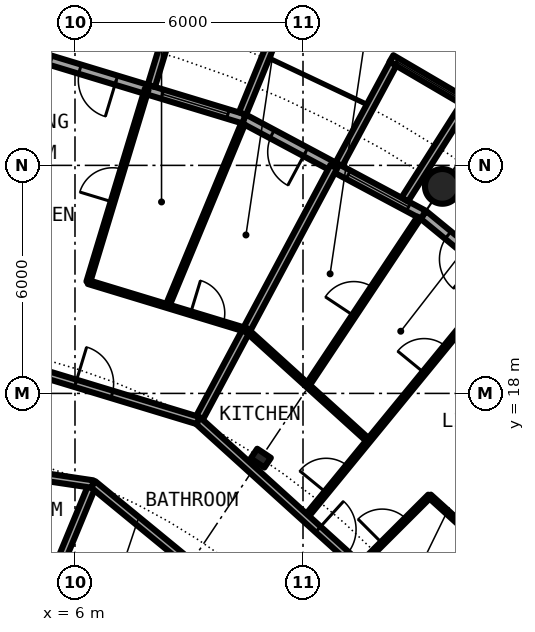
"""IFC4 building model, lengths in metres.
Left out: names, types, materials, properties, quantities, classifications, styles, units other than length and angle.
Written with IfcOpenShell. Run it as: python <this file> out.ifc"""

import sys

from ifc_helpers import new_model, si_unit, direction, frame, frame_2d, origin, origin_2d, place, context, subcontext, project, spatial, rectangle, circle, hollow_circle, i_section, extrude, element, fill, save


model = new_model("IFC4")
c1 = context("Model", 3, precision=1e-05, world=origin(), true_north=direction((0.0, 1.0)))
c2 = subcontext(c1, "Body", "Model", "MODEL_VIEW")
j1 = project(units=[si_unit("LENGTHUNIT", "METRE"), si_unit("PLANEANGLEUNIT", "RADIAN")], contexts=[c1])
p1 = place(None, origin())
s1 = spatial("IfcSite", under=j1, at=p1, CompositionType="ELEMENT")
p2 = place(p1, origin())
s2 = spatial("IfcBuilding", under=s1, at=p2, CompositionType="ELEMENT")
p3 = place(p2, frame((0.0, 0.0, 129.95)))
s3 = spatial("IfcBuildingStorey", under=s2, at=p3, CompositionType="ELEMENT", Elevation=129.95)
p4 = place(p3, frame((15.667, 23.448, 0.0), z_axis=(0.0, 0.0, 1.0), x_axis=(1.0, 0.0, 0.0)))
e1 = element("IfcColumn", 1, at=p4, inside=s3, PredefinedType="COLUMN", context=c2, shape_type="SweptSolid", body=[
    extrude(hollow_circle(Radius=0.457, WallThickness=0.04, at=origin_2d()), origin(), (0.0, 0.0, 1.0), 3.05),
])
p5 = place(p3, frame((10.889, 16.297, 0.0), z_axis=(0.0, 0.0, 1.0), x_axis=(0.55557023302, 0.831469612303, 0.0)))
e2 = element("IfcColumn", 2, at=p5, inside=s3, PredefinedType="COLUMN", context=c2, shape_type="SweptSolid", body=[
    extrude(i_section(OverallWidth=0.307, OverallDepth=0.432, WebThickness=0.021, FlangeThickness=0.04, FilletRadius=0.027, at=origin_2d()), origin(), (0.0, 0.0, 1.0), 3.05),
])
p6 = place(p3, frame((19.304, 19.304, 0.0), z_axis=(0.0, 0.0, 1.0), x_axis=(-0.773019449054, 0.634382322723, 0.0)))
e3 = element("IfcWall", 3, at=p6, inside=s3, PredefinedType="SOLIDWALL", context=c2, shape_type="SweptSolid", body=[
    extrude(rectangle(XDim=5.352, YDim=0.25, at=frame_2d((2.676, 0.0))), origin(), (0.0, 0.0, 1.0), 2.7),
])
p7 = place(p6, frame((0.441, 0.0, 0.3)))
e4 = element("IfcOpeningElement", 4, at=p7, cuts=e3, PredefinedType="OPENING", context=c2, shape_type="SweptSolid", body=[
    extrude(rectangle(XDim=1.8, YDim=2.1, at=frame_2d((0.9, 1.05))), frame((0.0, 0.135, 0.0), z_axis=(0.0, -1.0, 0.0), x_axis=(1.0, 0.0, 0.0)), (0.0, 0.0, 1.0), 0.27),
])
p8 = place(p6, frame((3.51, 0.0, 0.0)))
e5 = element("IfcOpeningElement", 5, at=p8, cuts=e3, PredefinedType="OPENING", context=c2, shape_type="SweptSolid", body=[
    extrude(rectangle(XDim=1.0, YDim=2.2, at=frame_2d((0.5, 1.1))), frame((0.0, 0.135, 0.0), z_axis=(0.0, -1.0, 0.0), x_axis=(1.0, 0.0, 0.0)), (0.0, 0.0, 1.0), 0.27),
])
p9 = place(p3, frame((15.167, 22.699, 0.0), z_axis=(0.0, 0.0, 1.0), x_axis=(-0.881915646801, 0.471407246368, 0.0)))
e6 = element("IfcWall", 6, at=p9, inside=s3, PredefinedType="SOLIDWALL", context=c2, shape_type="SweptSolid", body=[
    extrude(rectangle(XDim=5.352, YDim=0.25, at=frame_2d((2.676, 0.0))), origin(), (0.0, 0.0, 1.0), 2.7),
])
p10 = place(p9, frame((0.441, 0.0, 0.3)))
e7 = element("IfcOpeningElement", 7, at=p10, cuts=e6, PredefinedType="OPENING", context=c2, shape_type="SweptSolid", body=[
    extrude(rectangle(XDim=1.8, YDim=2.1, at=frame_2d((0.9, 1.05))), frame((0.0, 0.135, 0.0), z_axis=(0.0, -1.0, 0.0), x_axis=(1.0, 0.0, 0.0)), (0.0, 0.0, 1.0), 0.27),
])
p11 = place(p9, frame((3.51, 0.0, 0.0)))
e8 = element("IfcOpeningElement", 8, at=p11, cuts=e6, PredefinedType="OPENING", context=c2, shape_type="SweptSolid", body=[
    extrude(rectangle(XDim=1.0, YDim=2.2, at=frame_2d((0.5, 1.1))), frame((0.0, 0.135, 0.0), z_axis=(0.0, -1.0, 0.0), x_axis=(1.0, 0.0, 0.0)), (0.0, 0.0, 1.0), 0.27),
])
p12 = place(p3, frame((16.39, 25.603, -0.03), z_axis=(0.0, 0.0, 1.0), x_axis=(-0.862762477128, 0.505609442218, 0.0)))
e9 = element("IfcWall", 9, at=p12, inside=s3, PredefinedType="SOLIDWALL", context=c2, shape_type="SweptSolid", body=[
    extrude(rectangle(XDim=2.391, YDim=0.2, at=frame_2d((1.196, 0.0))), origin(), (0.0, 0.0, 1.0), 2.73),
])
p13 = place(p12, frame((0.156, 0.0, 0.33)))
e10 = element("IfcOpeningElement", 10, at=p13, cuts=e9, PredefinedType="OPENING", context=c2, shape_type="SweptSolid", body=[
    extrude(circle(Radius=1.04, at=frame_2d((1.04, 1.04))), frame((0.0, 0.11, 0.0), z_axis=(0.0, -1.0, 0.0), x_axis=(1.0, 0.0, 0.0)), (0.0, 0.0, 1.0), 0.22),
])
p14 = place(p3, frame((14.678, 23.102, -0.03), z_axis=(0.0, 0.0, 1.0), x_axis=(0.536001536573, 0.844217005746, 0.0)))
e11 = element("IfcWall", 11, at=p14, inside=s3, PredefinedType="SOLIDWALL", context=c2, shape_type="SweptSolid", body=[
    extrude(rectangle(XDim=2.929, YDim=0.2, at=frame_2d((1.465, 0.0))), origin(), (0.0, 0.0, 1.0), 2.73),
])
p15 = place(p3, frame((12.945, 24.029, -0.03), z_axis=(0.0, 0.0, 1.0), x_axis=(0.474424310775, 0.88029629861, 0.0)))
e12 = element("IfcWall", 12, at=p15, inside=s3, PredefinedType="SOLIDWALL", context=c2, shape_type="SweptSolid", body=[
    extrude(rectangle(XDim=3.006, YDim=0.2, at=frame_2d((1.503, 0.0))), origin(), (0.0, 0.0, 1.0), 2.73),
])
p16 = place(p3, frame((10.447, 25.222, 0.0), z_axis=(0.0, 0.0, 1.0), x_axis=(-0.956965678721, 0.290201119486, 0.0)))
e13 = element("IfcWall", 13, at=p16, inside=s3, PredefinedType="SOLIDWALL", context=c2, shape_type="SweptSolid", body=[
    extrude(rectangle(XDim=5.351, YDim=0.25, at=frame_2d((2.676, 0.0))), origin(), (0.0, 0.0, 1.0), 2.7),
])
p17 = place(p16, frame((0.441, 0.0, 0.3)))
e14 = element("IfcOpeningElement", 14, at=p17, cuts=e13, PredefinedType="OPENING", context=c2, shape_type="SweptSolid", body=[
    extrude(rectangle(XDim=1.8, YDim=2.1, at=frame_2d((0.9, 1.05))), frame((0.0, 0.135, 0.0), z_axis=(0.0, -1.0, 0.0), x_axis=(1.0, 0.0, 0.0)), (0.0, 0.0, 1.0), 0.27),
])
p18 = place(p16, frame((3.51, 0.0, 0.0)))
e15 = element("IfcOpeningElement", 15, at=p18, cuts=e13, PredefinedType="OPENING", context=c2, shape_type="SweptSolid", body=[
    extrude(rectangle(XDim=1.0, YDim=2.2, at=frame_2d((0.5, 1.1))), frame((0.0, 0.135, 0.0), z_axis=(0.0, -1.0, 0.0), x_axis=(1.0, 0.0, 0.0)), (0.0, 0.0, 1.0), 0.27),
])
p19 = place(p3, frame((10.409, 25.364, -0.03), z_axis=(0.0, 0.0, 1.0), x_axis=(0.379509886562, 0.925187681501, 0.0)))
e16 = element("IfcWall", 16, at=p19, inside=s3, PredefinedType="SOLIDWALL", context=c2, shape_type="SweptSolid", body=[
    extrude(rectangle(XDim=2.883, YDim=0.2, at=frame_2d((1.441, 0.0))), origin(), (0.0, 0.0, 1.0), 2.73),
])
p20 = place(p3, frame((8.009, 26.092, -0.03), z_axis=(0.0, 0.0, 1.0), x_axis=(0.293406695073, 0.955987715029, 0.0)))
e17 = element("IfcWall", 17, at=p20, inside=s3, PredefinedType="SOLIDWALL", context=c2, shape_type="SweptSolid", body=[
    extrude(rectangle(XDim=3.006, YDim=0.2, at=frame_2d((1.503, 0.0))), origin(), (0.0, 0.0, 1.0), 2.73),
])
p21 = place(p3, frame((2.955, 7.132, 0.0), z_axis=(0.0, 0.0, 1.0), x_axis=(0.382556139466, 0.923932248683, 0.0)))
e18 = element("IfcWall", 18, at=p21, inside=s3, PredefinedType="PARTITIONING", context=c2, shape_type="SweptSolid", body=[
    extrude(rectangle(XDim=9.18, YDim=0.2, at=frame_2d((4.59, 0.0))), origin(), (0.0, 0.0, 1.0), 2.7),
])
p22 = place(p3, frame((6.349, 20.93, 0.0), z_axis=(0.0, 0.0, 1.0), x_axis=(0.290172218727, 0.956974442438, 0.0)))
e19 = element("IfcWall", 19, at=p22, inside=s3, PredefinedType="PARTITIONING", context=c2, shape_type="SweptSolid", body=[
    extrude(rectangle(XDim=5.303, YDim=0.1, at=frame_2d((2.652, 0.0))), origin(), (0.0, 0.0, 1.0), 2.7),
])
p23 = place(p22, frame((2.202, 0.0, 0.0)))
e20 = element("IfcOpeningElement", 20, at=p23, cuts=e19, PredefinedType="OPENING", context=c2, shape_type="SweptSolid", body=[
    extrude(rectangle(XDim=0.9, YDim=2.3, at=frame_2d((0.45, 1.15))), frame((0.0, 0.06, 0.0), z_axis=(0.0, -1.0, 0.0), x_axis=(1.0, 0.0, 0.0)), (0.0, 0.0, 1.0), 0.12),
])
p24 = place(p3, frame((8.431, 20.298, 0.0), z_axis=(0.0, 0.0, 1.0), x_axis=(0.383480536297, 0.923548958248, 0.0)))
e21 = element("IfcWall", 21, at=p24, inside=s3, PredefinedType="PARTITIONING", context=c2, shape_type="SweptSolid", body=[
    extrude(rectangle(XDim=5.195, YDim=0.1, at=frame_2d((2.598, 0.0))), origin(), (0.0, 0.0, 1.0), 2.7),
])
p25 = place(p3, frame((9.239, 17.286, 0.0), z_axis=(0.0, 0.0, 1.0), x_axis=(0.471439510802, 0.881898399848, 0.0)))
e22 = element("IfcWall", 22, at=p25, inside=s3, PredefinedType="PARTITIONING", context=c2, shape_type="SweptSolid", body=[
    extrude(rectangle(XDim=7.575, YDim=0.2, at=frame_2d((3.787, 0.0))), origin(), (0.0, 0.0, 1.0), 2.7),
])
p26 = place(p3, frame((12.062, 14.727, 0.0), z_axis=(0.0, 0.0, 1.0), x_axis=(0.633664062855, 0.773608334654, 0.0)))
e23 = element("IfcWall", 23, at=p26, inside=s3, PredefinedType="PARTITIONING", context=c2, shape_type="SweptSolid", body=[
    extrude(rectangle(XDim=8.138, YDim=0.1, at=frame_2d((4.069, 0.0))), origin(), (0.0, 0.0, 1.0), 2.7),
])
p27 = place(p26, frame((0.861, 0.0, 0.0)))
e24 = element("IfcOpeningElement", 24, at=p27, cuts=e23, PredefinedType="OPENING", context=c2, shape_type="SweptSolid", body=[
    extrude(rectangle(XDim=0.9, YDim=2.3, at=frame_2d((0.45, 1.15))), frame((0.0, 0.06, 0.0), z_axis=(0.0, -1.0, 0.0), x_axis=(1.0, 0.0, 0.0)), (0.0, 0.0, 1.0), 0.12),
])
p28 = place(p26, frame((4.932, 0.0, 0.0)))
e25 = element("IfcOpeningElement", 25, at=p28, cuts=e23, PredefinedType="OPENING", context=c2, shape_type="SweptSolid", body=[
    extrude(rectangle(XDim=0.9, YDim=2.3, at=frame_2d((0.45, 1.15))), frame((0.0, 0.06, 0.0), z_axis=(0.0, -1.0, 0.0), x_axis=(1.0, 0.0, 0.0)), (0.0, 0.0, 1.0), 0.12),
])
p29 = place(p3, frame((12.118, 18.211, 0.0), z_axis=(0.0, 0.0, 1.0), x_axis=(0.553913391217, 0.832574294, 0.0)))
e26 = element("IfcWall", 26, at=p29, inside=s3, PredefinedType="PARTITIONING", context=c2, shape_type="SweptSolid", body=[
    extrude(rectangle(XDim=5.301, YDim=0.1, at=frame_2d((2.65, 0.0))), origin(), (0.0, 0.0, 1.0), 2.7),
])
p30 = place(p29, frame((2.2, 0.0, 0.0)))
e27 = element("IfcOpeningElement", 27, at=p30, cuts=e26, PredefinedType="OPENING", context=c2, shape_type="SweptSolid", body=[
    extrude(rectangle(XDim=0.9, YDim=2.3, at=frame_2d((0.45, 1.15))), frame((0.0, 0.06, 0.0), z_axis=(0.0, -1.0, 0.0), x_axis=(1.0, 0.0, 0.0)), (0.0, 0.0, 1.0), 0.12),
])
p31 = place(p3, frame((13.474, 13.448, 0.0), z_axis=(0.0, 0.0, 1.0), x_axis=(0.707851299421, 0.706361478217, 0.0)))
e28 = element("IfcWall", 28, at=p31, inside=s3, PredefinedType="PARTITIONING", context=c2, shape_type="SweptSolid", body=[
    extrude(rectangle(XDim=2.622, YDim=0.1, at=frame_2d((1.311, 0.0))), origin(), (0.0, 0.0, 1.0), 2.7),
])
p32 = place(p31, frame((0.861, 0.0, 0.0)))
e29 = element("IfcOpeningElement", 29, at=p32, cuts=e28, PredefinedType="OPENING", context=c2, shape_type="SweptSolid", body=[
    extrude(rectangle(XDim=0.9, YDim=2.3, at=frame_2d((0.45, 1.15))), frame((0.0, 0.06, 0.0), z_axis=(0.0, -1.0, 0.0), x_axis=(1.0, 0.0, 0.0)), (0.0, 0.0, 1.0), 0.12),
])
p33 = place(p3, frame((14.885, 12.168, 0.0), z_axis=(0.0, 0.0, 1.0), x_axis=(0.774162545943, 0.632986850147, 0.0)))
e30 = element("IfcWall", 30, at=p33, inside=s3, PredefinedType="PARTITIONING", context=c2, shape_type="SweptSolid", body=[
    extrude(rectangle(XDim=2.649, YDim=0.1, at=frame_2d((1.325, 0.0))), origin(), (0.0, 0.0, 1.0), 2.7),
])
p34 = place(p3, frame((6.47, 15.613, 0.0), z_axis=(0.0, 0.0, 1.0), x_axis=(0.77292501819, -0.634497372931, 0.0)))
e31 = element("IfcWall", 31, at=p34, inside=s3, PredefinedType="PARTITIONING", context=c2, shape_type="SweptSolid", body=[
    extrude(rectangle(XDim=9.81, YDim=0.2, at=frame_2d((4.905, 0.0))), origin(), (0.0, 0.0, 1.0), 2.7),
])
p35 = place(p34, frame((4.404, 0.0, 0.0)))
e32 = element("IfcOpeningElement", 32, at=p35, cuts=e31, PredefinedType="OPENING", context=c2, shape_type="SweptSolid", body=[
    extrude(rectangle(XDim=1.0, YDim=2.3, at=frame_2d((0.5, 1.15))), frame((0.0, 0.11, 0.0), z_axis=(0.0, -1.0, 0.0), x_axis=(1.0, 0.0, 0.0)), (0.0, 0.0, 1.0), 0.22),
])
p36 = place(p3, frame((-1.656, 16.819, 0.0), z_axis=(0.0, 0.0, 1.0), x_axis=(0.989174071716, -0.146746910856, 0.0)))
e33 = element("IfcWall", 33, at=p36, inside=s3, PredefinedType="PARTITIONING", context=c2, shape_type="SweptSolid", body=[
    extrude(rectangle(XDim=8.212, YDim=0.2, at=frame_2d((4.106, 0.0))), origin(), (0.0, 0.0, 1.0), 2.7),
])
p37 = place(p36, frame((3.614, 0.0, 0.0)))
e34 = element("IfcOpeningElement", 34, at=p37, cuts=e33, PredefinedType="OPENING", context=c2, shape_type="SweptSolid", body=[
    extrude(rectangle(XDim=1.0, YDim=2.3, at=frame_2d((0.5, 1.15))), frame((0.0, 0.11, 0.0), z_axis=(0.0, -1.0, 0.0), x_axis=(1.0, 0.0, 0.0)), (0.0, 0.0, 1.0), 0.22),
])
p38 = place(p3, frame((9.232, 17.289, 0.0), z_axis=(0.0, 0.0, 1.0), x_axis=(0.741112328493, -0.67138105168, 0.0)))
e35 = element("IfcWall", 35, at=p38, inside=s3, PredefinedType="PARTITIONING", context=c2, shape_type="SweptSolid", body=[
    extrude(rectangle(XDim=5.752, YDim=0.2, at=frame_2d((2.876, 0.0))), origin(), (0.0, 0.0, 1.0), 2.7),
])
p39 = place(p38, frame((4.27, 0.0, 0.0)))
e36 = element("IfcOpeningElement", 36, at=p39, cuts=e35, PredefinedType="OPENING", context=c2, shape_type="SweptSolid", body=[
    extrude(rectangle(XDim=1.0, YDim=2.3, at=frame_2d((0.5, 1.15))), frame((0.0, 0.11, 0.0), z_axis=(0.0, -1.0, 0.0), x_axis=(1.0, 0.0, 0.0)), (0.0, 0.0, 1.0), 0.22),
])
p40 = place(p3, frame((1.921, 19.506, 0.0), z_axis=(0.0, 0.0, 1.0), x_axis=(0.956929842753, -0.290319265721, 0.0)))
e37 = element("IfcWall", 37, at=p40, inside=s3, PredefinedType="PARTITIONING", context=c2, shape_type="SweptSolid", body=[
    extrude(rectangle(XDim=7.647, YDim=0.2, at=frame_2d((3.824, 0.0))), origin(), (0.0, 0.0, 1.0), 2.39),
])
p41 = place(p40, frame((4.28, 0.0, 0.0)))
e38 = element("IfcOpeningElement", 38, at=p41, cuts=e37, PredefinedType="OPENING", context=c2, shape_type="SweptSolid", body=[
    extrude(rectangle(XDim=1.0, YDim=2.3, at=frame_2d((0.5, 1.15))), frame((0.0, 0.11, 0.0), z_axis=(0.0, -1.0, 0.0), x_axis=(1.0, 0.0, 0.0)), (0.0, 0.0, 1.0), 0.22),
])
p42 = place(p3, frame((10.509, 19.669, 0.0), z_axis=(0.0, 0.0, 1.0), x_axis=(0.7410823244, -0.671414170584, 0.0)))
e39 = element("IfcWall", 39, at=p42, inside=s3, PredefinedType="PARTITIONING", context=c2, shape_type="SweptSolid", body=[
    extrude(rectangle(XDim=4.338, YDim=0.1, at=frame_2d((2.169, 0.0))), origin(), (0.0, 0.0, 1.0), 2.7),
])
p43 = place(p3, frame((15.33, 15.3, 0.0), z_axis=(0.0, 0.0, 1.0), x_axis=(0.740948416939, -0.671561943112, 0.0)))
e40 = element("IfcWall", 40, at=p43, inside=s3, PredefinedType="PARTITIONING", context=c2, shape_type="SweptSolid", body=[
    extrude(rectangle(XDim=4.335, YDim=0.1, at=frame_2d((2.167, 0.0))), origin(), (0.0, 0.0, 1.0), 2.7),
])
p44 = place(p43, frame((2.803, 0.0, 0.0)))
e41 = element("IfcOpeningElement", 41, at=p44, cuts=e40, PredefinedType="OPENING", context=c2, shape_type="SweptSolid", body=[
    extrude(rectangle(XDim=0.9, YDim=2.3, at=frame_2d((0.45, 1.15))), frame((0.0, 0.06, 0.0), z_axis=(0.0, -1.0, 0.0), x_axis=(1.0, 0.0, 0.0)), (0.0, 0.0, 1.0), 0.12),
])
p45 = place(p3, frame((6.351, 20.928, 0.0), z_axis=(0.0, 0.0, 1.0), x_axis=(0.956861661621, -0.290543904633, 0.0)))
e42 = element("IfcWall", 42, at=p45, inside=s3, PredefinedType="PARTITIONING", context=c2, shape_type="SweptSolid", body=[
    extrude(rectangle(XDim=4.357, YDim=0.1, at=frame_2d((2.178, 0.0))), origin(), (0.0, 0.0, 1.0), 2.7),
])
p46 = place(p45, frame((2.812, 0.0, 0.0)))
e43 = element("IfcOpeningElement", 43, at=p46, cuts=e42, PredefinedType="OPENING", context=c2, shape_type="SweptSolid", body=[
    extrude(rectangle(XDim=0.9, YDim=2.3, at=frame_2d((0.45, 1.15))), frame((0.0, 0.06, 0.0), z_axis=(0.0, -1.0, 0.0), x_axis=(1.0, 0.0, 0.0)), (0.0, 0.0, 1.0), 0.12),
])
p47 = place(p8, origin())
e44 = element("IfcDoor", 44, at=p47, inside=s3, OperationType="SINGLE_SWING_LEFT", PredefinedType="DOOR", context=c2, shape_type="SweptSolid", body=[
    extrude(rectangle(XDim=1.0, YDim=2.2, at=frame_2d((0.5, 1.1))), frame((0.0, 0.025, 0.0), z_axis=(0.0, -1.0, 0.0), x_axis=(1.0, 0.0, 0.0)), (0.0, 0.0, 1.0), 0.05),
])
fill(e5, e44)
p48 = place(p10, origin())
e45 = element("IfcWindow", 45, at=p48, inside=s3, PartitioningType="SINGLE_PANEL", PredefinedType="WINDOW", context=c2, shape_type="SweptSolid", body=[
    extrude(rectangle(XDim=1.8, YDim=2.1, at=frame_2d((0.9, 1.05))), frame((0.0, 0.03, 0.0), z_axis=(0.0, -1.0, 0.0), x_axis=(1.0, 0.0, 0.0)), (0.0, 0.0, 1.0), 0.06),
])
fill(e7, e45)
p49 = place(p13, origin())
e46 = element("IfcWindow", 46, at=p49, inside=s3, PartitioningType="SINGLE_PANEL", PredefinedType="WINDOW", context=c2, shape_type="SweptSolid", body=[
    extrude(circle(Radius=1.04, at=frame_2d((1.04, 1.04))), frame((0.0, 0.03, 0.0), z_axis=(0.0, -1.0, 0.0), x_axis=(1.0, 0.0, 0.0)), (0.0, 0.0, 1.0), 0.06),
])
fill(e10, e46)
p50 = place(p11, origin())
e47 = element("IfcDoor", 47, at=p50, inside=s3, OperationType="SINGLE_SWING_LEFT", PredefinedType="DOOR", context=c2, shape_type="SweptSolid", body=[
    extrude(rectangle(XDim=1.0, YDim=2.2, at=frame_2d((0.5, 1.1))), frame((0.0, 0.025, 0.0), z_axis=(0.0, -1.0, 0.0), x_axis=(1.0, 0.0, 0.0)), (0.0, 0.0, 1.0), 0.05),
])
fill(e8, e47)
p51 = place(p17, origin())
e48 = element("IfcWindow", 48, at=p51, inside=s3, PartitioningType="SINGLE_PANEL", PredefinedType="WINDOW", context=c2, shape_type="SweptSolid", body=[
    extrude(rectangle(XDim=1.8, YDim=2.1, at=frame_2d((0.9, 1.05))), frame((0.0, 0.03, 0.0), z_axis=(0.0, -1.0, 0.0), x_axis=(1.0, 0.0, 0.0)), (0.0, 0.0, 1.0), 0.06),
])
fill(e14, e48)
p52 = place(p18, origin())
e49 = element("IfcDoor", 49, at=p52, inside=s3, OperationType="SINGLE_SWING_LEFT", PredefinedType="DOOR", context=c2, shape_type="SweptSolid", body=[
    extrude(rectangle(XDim=1.0, YDim=2.2, at=frame_2d((0.5, 1.1))), frame((0.0, 0.025, 0.0), z_axis=(0.0, -1.0, 0.0), x_axis=(1.0, 0.0, 0.0)), (0.0, 0.0, 1.0), 0.05),
])
fill(e15, e49)
p53 = place(p39, origin())
e50 = element("IfcDoor", 50, at=p53, inside=s3, OperationType="SINGLE_SWING_RIGHT", PredefinedType="DOOR", context=c2, shape_type="SweptSolid", body=[
    extrude(rectangle(XDim=1.0, YDim=2.3, at=frame_2d((0.5, 1.15))), frame((0.0, 0.025, 0.0), z_axis=(0.0, -1.0, 0.0), x_axis=(1.0, 0.0, 0.0)), (0.0, 0.0, 1.0), 0.05),
])
fill(e36, e50)
p54 = place(p32, origin())
e51 = element("IfcDoor", 51, at=p54, inside=s3, OperationType="SINGLE_SWING_LEFT", PredefinedType="DOOR", context=c2, shape_type="SweptSolid", body=[
    extrude(rectangle(XDim=0.9, YDim=2.3, at=frame_2d((0.45, 1.15))), frame((0.0, 0.025, 0.0), z_axis=(0.0, -1.0, 0.0), x_axis=(1.0, 0.0, 0.0)), (0.0, 0.0, 1.0), 0.05),
])
fill(e29, e51)
p55 = place(p27, origin())
e52 = element("IfcDoor", 52, at=p55, inside=s3, OperationType="SINGLE_SWING_LEFT", PredefinedType="DOOR", context=c2, shape_type="SweptSolid", body=[
    extrude(rectangle(XDim=0.9, YDim=2.3, at=frame_2d((0.45, 1.15))), frame((0.0, 0.025, 0.0), z_axis=(0.0, -1.0, 0.0), x_axis=(1.0, 0.0, 0.0)), (0.0, 0.0, 1.0), 0.05),
])
fill(e24, e52)
p56 = place(p28, origin())
e53 = element("IfcDoor", 53, at=p56, inside=s3, OperationType="SINGLE_SWING_RIGHT", PredefinedType="DOOR", context=c2, shape_type="SweptSolid", body=[
    extrude(rectangle(XDim=0.9, YDim=2.3, at=frame_2d((0.45, 1.15))), frame((0.0, 0.025, 0.0), z_axis=(0.0, -1.0, 0.0), x_axis=(1.0, 0.0, 0.0)), (0.0, 0.0, 1.0), 0.05),
])
fill(e25, e53)
p57 = place(p30, origin())
e54 = element("IfcDoor", 54, at=p57, inside=s3, OperationType="SINGLE_SWING_LEFT", PredefinedType="DOOR", context=c2, shape_type="SweptSolid", body=[
    extrude(rectangle(XDim=0.9, YDim=2.3, at=frame_2d((0.45, 1.15))), frame((0.0, 0.025, 0.0), z_axis=(0.0, -1.0, 0.0), x_axis=(1.0, 0.0, 0.0)), (0.0, 0.0, 1.0), 0.05),
])
fill(e27, e54)
p58 = place(p41, origin())
e55 = element("IfcDoor", 55, at=p58, inside=s3, OperationType="SINGLE_SWING_RIGHT", PredefinedType="DOOR", context=c2, shape_type="SweptSolid", body=[
    extrude(rectangle(XDim=1.0, YDim=2.3, at=frame_2d((0.5, 1.15))), frame((0.0, 0.025, 0.0), z_axis=(0.0, -1.0, 0.0), x_axis=(1.0, 0.0, 0.0)), (0.0, 0.0, 1.0), 0.05),
])
fill(e38, e55)
p59 = place(p23, origin())
e56 = element("IfcDoor", 56, at=p59, inside=s3, OperationType="SINGLE_SWING_RIGHT", PredefinedType="DOOR", context=c2, shape_type="SweptSolid", body=[
    extrude(rectangle(XDim=0.9, YDim=2.3, at=frame_2d((0.45, 1.15))), frame((0.0, 0.025, 0.0), z_axis=(0.0, -1.0, 0.0), x_axis=(1.0, 0.0, 0.0)), (0.0, 0.0, 1.0), 0.05),
])
fill(e20, e56)
p60 = place(p46, origin())
e57 = element("IfcDoor", 57, at=p60, inside=s3, OperationType="SINGLE_SWING_RIGHT", PredefinedType="DOOR", context=c2, shape_type="SweptSolid", body=[
    extrude(rectangle(XDim=0.9, YDim=2.3, at=frame_2d((0.45, 1.15))), frame((0.0, 0.025, 0.0), z_axis=(0.0, -1.0, 0.0), x_axis=(1.0, 0.0, 0.0)), (0.0, 0.0, 1.0), 0.05),
])
fill(e43, e57)
save(model, sys.argv[1])
